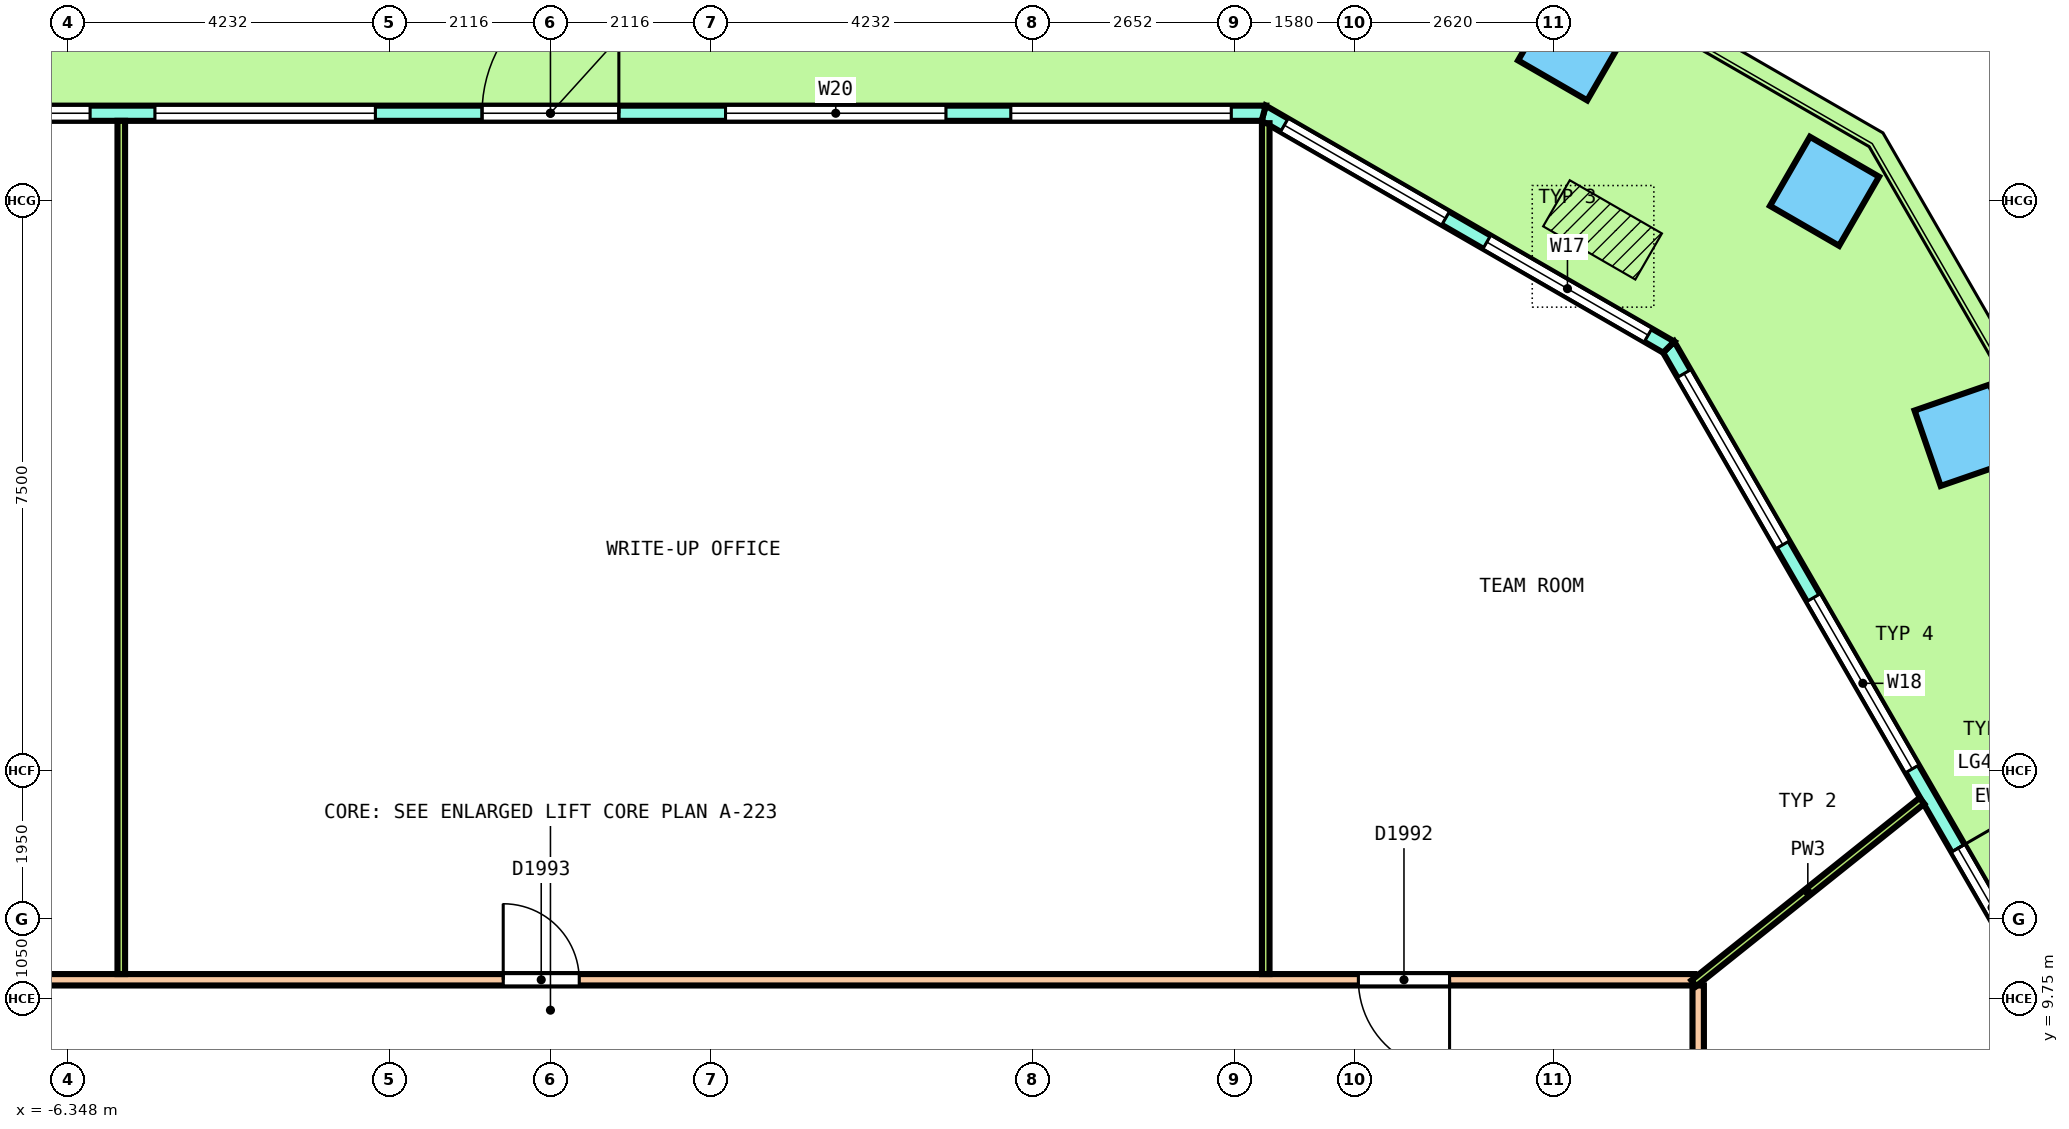
"""IFC4 building model, lengths in metres.
Left out: names, types, materials, properties, quantities, classifications, styles, units other than length and angle.
Written with IfcOpenShell. Run it as: python <this file> out.ifc"""

import sys

from ifc_helpers import new_model, si_unit, direction, frame, frame_2d, origin, origin_2d, place, context, subcontext, project, spatial, polyline, rectangle, outline, extrude, element, fill, save


model = new_model("IFC4")
c1 = context("Model", 3, precision=1e-05, world=origin(), true_north=direction((0.0, 1.0)))
c2 = subcontext(c1, "Body", "Model", "MODEL_VIEW")
j1 = project(units=[si_unit("LENGTHUNIT", "METRE"), si_unit("PLANEANGLEUNIT", "RADIAN")], contexts=[c1])
p1 = place(None, origin())
s1 = spatial("IfcSite", under=j1, at=p1, CompositionType="ELEMENT")
p2 = place(p1, origin())
s2 = spatial("IfcBuilding", under=s1, at=p2, CompositionType="ELEMENT")
p3 = place(p2, frame((0.0, 0.0, 227.4)))
s3 = spatial("IfcBuildingStorey", under=s2, at=p3, CompositionType="ELEMENT", Elevation=227.4)
p4 = place(p3, frame((18.615, 17.165, 0.0), z_axis=(0.032621940247, 0.006283734392, 0.999448009502), x_axis=(-0.499397291693, 0.866305109606, 0.01085366852)))
e1 = element("IfcColumn", 1, at=p4, inside=s3, PredefinedType="COLUMN", context=c2, shape_type="SweptSolid", body=[
    extrude(rectangle(XDim=1.05, YDim=1.05, at=origin_2d()), origin(), (0.0, 0.0, 1.0), 3.652),
])
for number, where, z_axis, x_axis in (
    (2, (16.762, 20.373, 0.0), (0.036, 0.0, 0.999), (-0.865, 0.5, 0.031)),
    (3, (13.448, 22.287, 0.0), (0.036, 0.0, 0.999), (-0.865, 0.5, 0.031)),
):
    element("IfcColumn", number, at=place(p3, frame(where, z_axis=z_axis, x_axis=x_axis)), inside=s3, PredefinedType="COLUMN", context=c2, shape_type="SweptSolid", body=[
        extrude(rectangle(XDim=1.05, YDim=1.05, at=origin_2d()), origin(), (0.0, 0.0, 1.0), 3.653),
    ])
p5 = place(p3, frame((23.225, 3.579, 0.0), z_axis=(0.0, 0.0, 1.0), x_axis=(-0.499996370621, 0.866027499197, 0.0)))
e4 = element("IfcWall", 4, at=p5, inside=s3, PredefinedType="SOLIDWALL", context=c2, shape_type="SweptSolid", body=[
    extrude(outline(polyline([(-0.027, -0.1), (0.978, -0.1), (1.982, -0.1), (2.987, -0.1), (3.992, -0.1), (4.996, -0.1), (6.001, -0.1), (7.006, -0.1), (8.01, -0.1), (9.015, -0.1), (10.02, -0.1), (11.024, -0.1), (12.029, -0.1), (13.033, -0.1), (14.038, -0.1), (15.043, -0.1), (16.047, -0.1), (17.052, -0.1), (16.998, 0.1), (16.0, 0.1), (15.002, 0.1), (14.003, 0.1), (13.005, 0.1), (12.007, 0.1), (11.008, 0.1), (10.01, 0.1), (9.012, 0.1), (8.013, 0.1), (7.015, 0.1), (6.017, 0.1), (5.019, 0.1), (4.02, 0.1), (3.022, 0.1), (2.023, 0.1), (1.025, 0.1), (0.027, 0.1), (-0.027, -0.1)])), origin(), (0.0, 0.0, 1.0), 3.7),
])
p6 = place(p5, frame((0.403, 0.0, 0.1)))
e5 = element("IfcOpeningElement", 5, at=p6, cuts=e4, PredefinedType="OPENING", context=c2, shape_type="SweptSolid", body=[
    extrude(rectangle(XDim=2.6, YDim=2.65, at=frame_2d((1.3, 1.325))), frame((0.0, 0.11, 0.0), z_axis=(0.0, -1.0, 0.0), x_axis=(1.0, 0.0, 0.0)), (0.0, 0.0, 1.0), 0.22),
])
p7 = place(p5, frame((3.808, 0.0, 0.1)))
e6 = element("IfcOpeningElement", 6, at=p7, cuts=e4, PredefinedType="OPENING", context=c2, shape_type="SweptSolid", body=[
    extrude(rectangle(XDim=2.6, YDim=2.65, at=frame_2d((1.3, 1.325))), frame((0.0, 0.11, 0.0), z_axis=(0.0, -1.0, 0.0), x_axis=(1.0, 0.0, 0.0)), (0.0, 0.0, 1.0), 0.22),
])
p8 = place(p5, frame((7.613, 0.0, 0.0)))
e7 = element("IfcOpeningElement", 7, at=p8, cuts=e4, PredefinedType="OPENING", context=c2, shape_type="SweptSolid", body=[
    extrude(rectangle(XDim=1.8, YDim=2.4, at=frame_2d((0.9, 1.2))), frame((0.0, 0.11, 0.0), z_axis=(0.0, -1.0, 0.0), x_axis=(1.0, 0.0, 0.0)), (0.0, 0.0, 1.0), 0.22),
])
p9 = place(p5, frame((7.613, 0.0, 2.55)))
e8 = element("IfcOpeningElement", 8, at=p9, cuts=e4, PredefinedType="OPENING", context=c2, shape_type="SweptSolid", body=[
    extrude(rectangle(XDim=1.8, YDim=0.2, at=frame_2d((0.9, 0.1))), frame((0.0, 0.11, 0.0), z_axis=(0.0, -1.0, 0.0), x_axis=(1.0, 0.0, 0.0)), (0.0, 0.0, 1.0), 0.22),
])
p10 = place(p5, frame((10.618, 0.0, 0.1)))
e9 = element("IfcOpeningElement", 9, at=p10, cuts=e4, PredefinedType="OPENING", context=c2, shape_type="SweptSolid", body=[
    extrude(rectangle(XDim=2.6, YDim=2.65, at=frame_2d((1.3, 1.325))), frame((0.0, 0.11, 0.0), z_axis=(0.0, -1.0, 0.0), x_axis=(1.0, 0.0, 0.0)), (0.0, 0.0, 1.0), 0.22),
])
p11 = place(p5, frame((14.023, 0.0, 0.1)))
e10 = element("IfcOpeningElement", 10, at=p11, cuts=e4, PredefinedType="OPENING", context=c2, shape_type="SweptSolid", body=[
    extrude(rectangle(XDim=2.6, YDim=2.65, at=frame_2d((1.3, 1.325))), frame((0.0, 0.11, 0.0), z_axis=(0.0, -1.0, 0.0), x_axis=(1.0, 0.0, 0.0)), (0.0, 0.0, 1.0), 0.22),
])
p12 = place(p3, frame((14.712, 18.323, 0.0), z_axis=(0.0, 0.0, 1.0), x_axis=(-0.866029647142, 0.499992650217, 0.0)))
e11 = element("IfcWall", 11, at=p12, inside=s3, PredefinedType="SOLIDWALL", context=c2, shape_type="SweptSolid", body=[
    extrude(outline(polyline([(-0.027, -0.1), (1.008, -0.1), (2.042, -0.1), (3.076, -0.1), (4.111, -0.1), (5.145, -0.1), (6.18, -0.1), (6.126, 0.1), (5.109, 0.1), (4.093, 0.1), (3.076, 0.1), (2.06, 0.1), (1.043, 0.1), (0.027, 0.1), (-0.027, -0.1)])), origin(), (0.0, 0.0, 1.0), 3.7),
])
p13 = place(p12, frame((0.313, 0.0, 0.1)))
e12 = element("IfcOpeningElement", 12, at=p13, cuts=e11, PredefinedType="OPENING", context=c2, shape_type="SweptSolid", body=[
    extrude(rectangle(XDim=2.45, YDim=2.65, at=frame_2d((1.225, 1.325))), frame((0.0, 0.11, 0.0), z_axis=(0.0, -1.0, 0.0), x_axis=(1.0, 0.0, 0.0)), (0.0, 0.0, 1.0), 0.22),
])
p14 = place(p12, frame((3.39, 0.0, 0.1)))
e13 = element("IfcOpeningElement", 13, at=p14, cuts=e11, PredefinedType="OPENING", context=c2, shape_type="SweptSolid", body=[
    extrude(rectangle(XDim=2.45, YDim=2.65, at=frame_2d((1.225, 1.325))), frame((0.0, 0.11, 0.0), z_axis=(0.0, -1.0, 0.0), x_axis=(1.0, 0.0, 0.0)), (0.0, 0.0, 1.0), 0.22),
])
p15 = place(p3, frame((9.384, 21.4, 0.0), z_axis=(0.0, 0.0, 1.0), x_axis=(-1.0, 0.0, 0.0)))
e14 = element("IfcWall", 14, at=p15, inside=s3, PredefinedType="SOLIDWALL", context=c2, shape_type="SweptSolid", body=[
    extrude(outline(polyline([(-0.027, -0.1), (1.019, -0.1), (2.064, -0.1), (3.11, -0.1), (4.156, -0.1), (5.201, -0.1), (6.247, -0.1), (7.292, -0.1), (8.338, -0.1), (9.384, -0.1), (10.429, -0.1), (11.475, -0.1), (12.52, -0.1), (13.566, -0.1), (14.612, -0.1), (15.657, -0.1), (16.703, -0.1), (17.748, -0.1), (18.794, -0.1), (18.74, 0.1), (17.701, 0.1), (16.661, 0.1), (15.621, 0.1), (14.582, 0.1), (13.542, 0.1), (12.502, 0.1), (11.463, 0.1), (10.423, 0.1), (9.384, 0.1), (8.344, 0.1), (7.304, 0.1), (6.265, 0.1), (5.225, 0.1), (4.185, 0.1), (3.146, 0.1), (2.106, 0.1), (1.066, 0.1), (0.027, 0.1), (-0.027, -0.1)])), origin(), (0.0, 0.0, 1.0), 3.7),
])
p16 = place(p15, frame((0.427, 0.0, 0.1)))
e15 = element("IfcOpeningElement", 15, at=p16, cuts=e14, PredefinedType="OPENING", context=c2, shape_type="SweptSolid", body=[
    extrude(rectangle(XDim=2.9, YDim=2.65, at=frame_2d((1.45, 1.325))), frame((0.0, 0.11, 0.0), z_axis=(0.0, -1.0, 0.0), x_axis=(1.0, 0.0, 0.0)), (0.0, 0.0, 1.0), 0.22),
])
p17 = place(p15, frame((4.18, 0.0, 0.1)))
e16 = element("IfcOpeningElement", 16, at=p17, cuts=e14, PredefinedType="OPENING", context=c2, shape_type="SweptSolid", body=[
    extrude(rectangle(XDim=2.9, YDim=2.65, at=frame_2d((1.45, 1.325))), frame((0.0, 0.11, 0.0), z_axis=(0.0, -1.0, 0.0), x_axis=(1.0, 0.0, 0.0)), (0.0, 0.0, 1.0), 0.22),
])
p18 = place(p15, frame((8.483, 0.0, 0.0)))
e17 = element("IfcOpeningElement", 17, at=p18, cuts=e14, PredefinedType="OPENING", context=c2, shape_type="SweptSolid", body=[
    extrude(rectangle(XDim=1.8, YDim=2.4, at=frame_2d((0.9, 1.2))), frame((0.0, 0.11, 0.0), z_axis=(0.0, -1.0, 0.0), x_axis=(1.0, 0.0, 0.0)), (0.0, 0.0, 1.0), 0.22),
])
p19 = place(p15, frame((8.483, 0.0, 2.55)))
e18 = element("IfcOpeningElement", 18, at=p19, cuts=e14, PredefinedType="OPENING", context=c2, shape_type="SweptSolid", body=[
    extrude(rectangle(XDim=1.8, YDim=0.2, at=frame_2d((0.9, 0.1))), frame((0.0, 0.11, 0.0), z_axis=(0.0, -1.0, 0.0), x_axis=(1.0, 0.0, 0.0)), (0.0, 0.0, 1.0), 0.22),
])
p20 = place(p15, frame((11.687, 0.0, 0.1)))
e19 = element("IfcOpeningElement", 19, at=p20, cuts=e14, PredefinedType="OPENING", context=c2, shape_type="SweptSolid", body=[
    extrude(rectangle(XDim=2.9, YDim=2.65, at=frame_2d((1.45, 1.325))), frame((0.0, 0.11, 0.0), z_axis=(0.0, -1.0, 0.0), x_axis=(1.0, 0.0, 0.0)), (0.0, 0.0, 1.0), 0.22),
])
p21 = place(p15, frame((15.44, 0.0, 0.1)))
e20 = element("IfcOpeningElement", 20, at=p21, cuts=e14, PredefinedType="OPENING", context=c2, shape_type="SweptSolid", body=[
    extrude(rectangle(XDim=2.9, YDim=2.65, at=frame_2d((1.45, 1.325))), frame((0.0, 0.11, 0.0), z_axis=(0.0, -1.0, 0.0), x_axis=(1.0, 0.0, 0.0)), (0.0, 0.0, 1.0), 0.22),
])
p22 = place(p3, frame((15.1, -0.124, 0.0), z_axis=(0.0, 0.0, 1.0), x_axis=(0.0, 1.0, 0.0)))
e21 = element("IfcWall", 21, at=p22, inside=s3, PredefinedType="PARTITIONING", context=c2, shape_type="SweptSolid", body=[
    extrude(rectangle(XDim=10.049, YDim=0.15, at=frame_2d((5.024, 0.0))), origin(), (0.0, 0.0, 1.0), 2.8),
])
p23 = place(p22, frame((2.4, 0.0, 0.0)))
e22 = element("IfcOpeningElement", 22, at=p23, cuts=e21, PredefinedType="OPENING", context=c2, shape_type="SweptSolid", body=[
    extrude(rectangle(XDim=1.0, YDim=2.1, at=frame_2d((0.5, 1.05))), frame((0.0, 0.085, 0.0), z_axis=(0.0, -1.0, 0.0), x_axis=(1.0, 0.0, 0.0)), (0.0, 0.0, 1.0), 0.17),
])
p24 = place(p3, frame((-15.025, 10.0, 0.0), z_axis=(0.0, 0.0, 1.0), x_axis=(1.0, 0.0, 0.0)))
e23 = element("IfcWall", 23, at=p24, inside=s3, PredefinedType="PARTITIONING", context=c2, shape_type="SweptSolid", body=[
    extrude(rectangle(XDim=30.075, YDim=0.15, at=frame_2d((15.038, 0.0))), origin(), (0.0, 0.0, 1.0), 2.8),
])
p25 = place(p24, frame((25.654, 0.0, 0.0)))
e24 = element("IfcOpeningElement", 24, at=p25, cuts=e23, PredefinedType="OPENING", context=c2, shape_type="SweptSolid", body=[
    extrude(rectangle(XDim=1.2, YDim=2.1, at=frame_2d((0.6, 1.05))), frame((0.0, 0.085, 0.0), z_axis=(0.0, -1.0, 0.0), x_axis=(1.0, 0.0, 0.0)), (0.0, 0.0, 1.0), 0.17),
])
p26 = place(p24, frame((14.404, 0.0, 0.0)))
e25 = element("IfcOpeningElement", 25, at=p26, cuts=e23, PredefinedType="OPENING", context=c2, shape_type="SweptSolid", body=[
    extrude(rectangle(XDim=1.0, YDim=2.1, at=frame_2d((0.5, 1.05))), frame((0.0, 0.085, 0.0), z_axis=(0.0, -1.0, 0.0), x_axis=(1.0, 0.0, 0.0)), (0.0, 0.0, 1.0), 0.17),
])
p27 = place(p24, frame((2.919, 0.0, 0.0)))
e26 = element("IfcOpeningElement", 26, at=p27, cuts=e23, PredefinedType="OPENING", context=c2, shape_type="SweptSolid", body=[
    extrude(rectangle(XDim=1.2, YDim=2.1, at=frame_2d((0.6, 1.05))), frame((0.0, 0.085, 0.0), z_axis=(0.0, -1.0, 0.0), x_axis=(1.0, 0.0, 0.0)), (0.0, 0.0, 1.0), 0.17),
])
p28 = place(p3, frame((15.042, 9.953, 0.0), z_axis=(0.0, 0.0, 1.0), x_axis=(0.780930772554, 0.62461758579, 0.0)))
e27 = element("IfcWall", 27, at=p28, inside=s3, PredefinedType="PARTITIONING", context=c2, shape_type="SweptSolid", body=[
    extrude(rectangle(XDim=3.844, YDim=0.1, at=frame_2d((1.922, 0.0))), origin(), (0.0, 0.0, 1.0), 2.8),
])
p29 = place(p3, frame((9.41, 10.075, 0.0), z_axis=(0.0, 0.0, 1.0), x_axis=(0.0, 1.0, 0.0)))
e28 = element("IfcWall", 28, at=p29, inside=s3, PredefinedType="PARTITIONING", context=c2, shape_type="SweptSolid", body=[
    extrude(rectangle(XDim=11.194, YDim=0.1, at=frame_2d((5.597, 0.0))), origin(), (0.0, 0.0, 1.0), 2.8),
])
p30 = place(p3, frame((-5.646, 10.075, 0.0), z_axis=(0.0, 0.0, 1.0), x_axis=(0.0, 1.0, 0.0)))
e29 = element("IfcWall", 29, at=p30, inside=s3, PredefinedType="PARTITIONING", context=c2, shape_type="SweptSolid", body=[
    extrude(rectangle(XDim=11.225, YDim=0.1, at=frame_2d((5.613, 0.0))), origin(), (0.0, 0.0, 1.0), 2.8),
])
p31 = place(p8, origin())
e30 = element("IfcDoor", 30, at=p31, inside=s3, OperationType="DOUBLE_DOOR_SINGLE_SWING", PredefinedType="DOOR", context=c2, shape_type="SweptSolid", body=[
    extrude(rectangle(XDim=1.8, YDim=2.4, at=frame_2d((0.9, 1.2))), frame((0.0, 0.025, 0.0), z_axis=(0.0, -1.0, 0.0), x_axis=(1.0, 0.0, 0.0)), (0.0, 0.0, 1.0), 0.05),
])
fill(e7, e30)
p32 = place(p9, origin())
e31 = element("IfcWindow", 31, at=p32, inside=s3, PartitioningType="SINGLE_PANEL", PredefinedType="WINDOW", context=c2, shape_type="SweptSolid", body=[
    extrude(rectangle(XDim=1.8, YDim=0.2, at=frame_2d((0.9, 0.1))), frame((0.0, 0.03, 0.0), z_axis=(0.0, -1.0, 0.0), x_axis=(1.0, 0.0, 0.0)), (0.0, 0.0, 1.0), 0.06),
])
fill(e8, e31)
p33 = place(p10, origin())
e32 = element("IfcWindow", 32, at=p33, inside=s3, PartitioningType="SINGLE_PANEL", PredefinedType="WINDOW", context=c2, shape_type="SweptSolid", body=[
    extrude(rectangle(XDim=2.6, YDim=2.65, at=frame_2d((1.3, 1.325))), frame((0.0, 0.03, 0.0), z_axis=(0.0, -1.0, 0.0), x_axis=(1.0, 0.0, 0.0)), (0.0, 0.0, 1.0), 0.06),
])
fill(e9, e32)
p34 = place(p11, origin())
e33 = element("IfcWindow", 33, at=p34, inside=s3, PartitioningType="SINGLE_PANEL", PredefinedType="WINDOW", context=c2, shape_type="SweptSolid", body=[
    extrude(rectangle(XDim=2.6, YDim=2.65, at=frame_2d((1.3, 1.325))), frame((0.0, 0.03, 0.0), z_axis=(0.0, -1.0, 0.0), x_axis=(1.0, 0.0, 0.0)), (0.0, 0.0, 1.0), 0.06),
])
fill(e10, e33)
p35 = place(p13, origin())
e34 = element("IfcWindow", 34, at=p35, inside=s3, PartitioningType="SINGLE_PANEL", PredefinedType="WINDOW", context=c2, shape_type="SweptSolid", body=[
    extrude(rectangle(XDim=2.45, YDim=2.65, at=frame_2d((1.225, 1.325))), frame((0.0, 0.03, 0.0), z_axis=(0.0, -1.0, 0.0), x_axis=(1.0, 0.0, 0.0)), (0.0, 0.0, 1.0), 0.06),
])
fill(e12, e34)
p36 = place(p14, origin())
e35 = element("IfcWindow", 35, at=p36, inside=s3, PartitioningType="SINGLE_PANEL", PredefinedType="WINDOW", context=c2, shape_type="SweptSolid", body=[
    extrude(rectangle(XDim=2.45, YDim=2.65, at=frame_2d((1.225, 1.325))), frame((0.0, 0.03, 0.0), z_axis=(0.0, -1.0, 0.0), x_axis=(1.0, 0.0, 0.0)), (0.0, 0.0, 1.0), 0.06),
])
fill(e13, e35)
p37 = place(p16, origin())
e36 = element("IfcWindow", 36, at=p37, inside=s3, PartitioningType="SINGLE_PANEL", PredefinedType="WINDOW", context=c2, shape_type="SweptSolid", body=[
    extrude(rectangle(XDim=2.9, YDim=2.65, at=frame_2d((1.45, 1.325))), frame((0.0, 0.03, 0.0), z_axis=(0.0, -1.0, 0.0), x_axis=(1.0, 0.0, 0.0)), (0.0, 0.0, 1.0), 0.06),
])
fill(e15, e36)
p38 = place(p17, origin())
e37 = element("IfcWindow", 37, at=p38, inside=s3, PartitioningType="SINGLE_PANEL", PredefinedType="WINDOW", context=c2, shape_type="SweptSolid", body=[
    extrude(rectangle(XDim=2.9, YDim=2.65, at=frame_2d((1.45, 1.325))), frame((0.0, 0.03, 0.0), z_axis=(0.0, -1.0, 0.0), x_axis=(1.0, 0.0, 0.0)), (0.0, 0.0, 1.0), 0.06),
])
fill(e16, e37)
p39 = place(p18, origin())
e38 = element("IfcDoor", 38, at=p39, inside=s3, OperationType="DOUBLE_DOOR_SINGLE_SWING", PredefinedType="DOOR", context=c2, shape_type="SweptSolid", body=[
    extrude(rectangle(XDim=1.8, YDim=2.4, at=frame_2d((0.9, 1.2))), frame((0.0, 0.025, 0.0), z_axis=(0.0, -1.0, 0.0), x_axis=(1.0, 0.0, 0.0)), (0.0, 0.0, 1.0), 0.05),
])
fill(e17, e38)
p40 = place(p19, origin())
e39 = element("IfcWindow", 39, at=p40, inside=s3, PartitioningType="SINGLE_PANEL", PredefinedType="WINDOW", context=c2, shape_type="SweptSolid", body=[
    extrude(rectangle(XDim=1.8, YDim=0.2, at=frame_2d((0.9, 0.1))), frame((0.0, 0.03, 0.0), z_axis=(0.0, -1.0, 0.0), x_axis=(1.0, 0.0, 0.0)), (0.0, 0.0, 1.0), 0.06),
])
fill(e18, e39)
p41 = place(p20, origin())
e40 = element("IfcWindow", 40, at=p41, inside=s3, PartitioningType="SINGLE_PANEL", PredefinedType="WINDOW", context=c2, shape_type="SweptSolid", body=[
    extrude(rectangle(XDim=2.9, YDim=2.65, at=frame_2d((1.45, 1.325))), frame((0.0, 0.03, 0.0), z_axis=(0.0, -1.0, 0.0), x_axis=(1.0, 0.0, 0.0)), (0.0, 0.0, 1.0), 0.06),
])
fill(e19, e40)
p42 = place(p21, origin())
e41 = element("IfcWindow", 41, at=p42, inside=s3, PartitioningType="SINGLE_PANEL", PredefinedType="WINDOW", context=c2, shape_type="SweptSolid", body=[
    extrude(rectangle(XDim=2.9, YDim=2.65, at=frame_2d((1.45, 1.325))), frame((0.0, 0.03, 0.0), z_axis=(0.0, -1.0, 0.0), x_axis=(1.0, 0.0, 0.0)), (0.0, 0.0, 1.0), 0.06),
])
fill(e20, e41)
p43 = place(p25, origin())
e42 = element("IfcDoor", 42, at=p43, inside=s3, OperationType="DOUBLE_DOOR_SINGLE_SWING", PredefinedType="DOOR", context=c2, shape_type="SweptSolid", body=[
    extrude(rectangle(XDim=1.2, YDim=2.1, at=frame_2d((0.6, 1.05))), frame((0.0, 0.025, 0.0), z_axis=(0.0, -1.0, 0.0), x_axis=(1.0, 0.0, 0.0)), (0.0, 0.0, 1.0), 0.05),
])
fill(e24, e42)
p44 = place(p26, origin())
e43 = element("IfcDoor", 43, at=p44, inside=s3, OperationType="SINGLE_SWING_LEFT", PredefinedType="DOOR", context=c2, shape_type="SweptSolid", body=[
    extrude(rectangle(XDim=1.0, YDim=2.1, at=frame_2d((0.5, 1.05))), frame((0.0, 0.025, 0.0), z_axis=(0.0, -1.0, 0.0), x_axis=(1.0, 0.0, 0.0)), (0.0, 0.0, 1.0), 0.05),
])
fill(e25, e43)
save(model, sys.argv[1])
